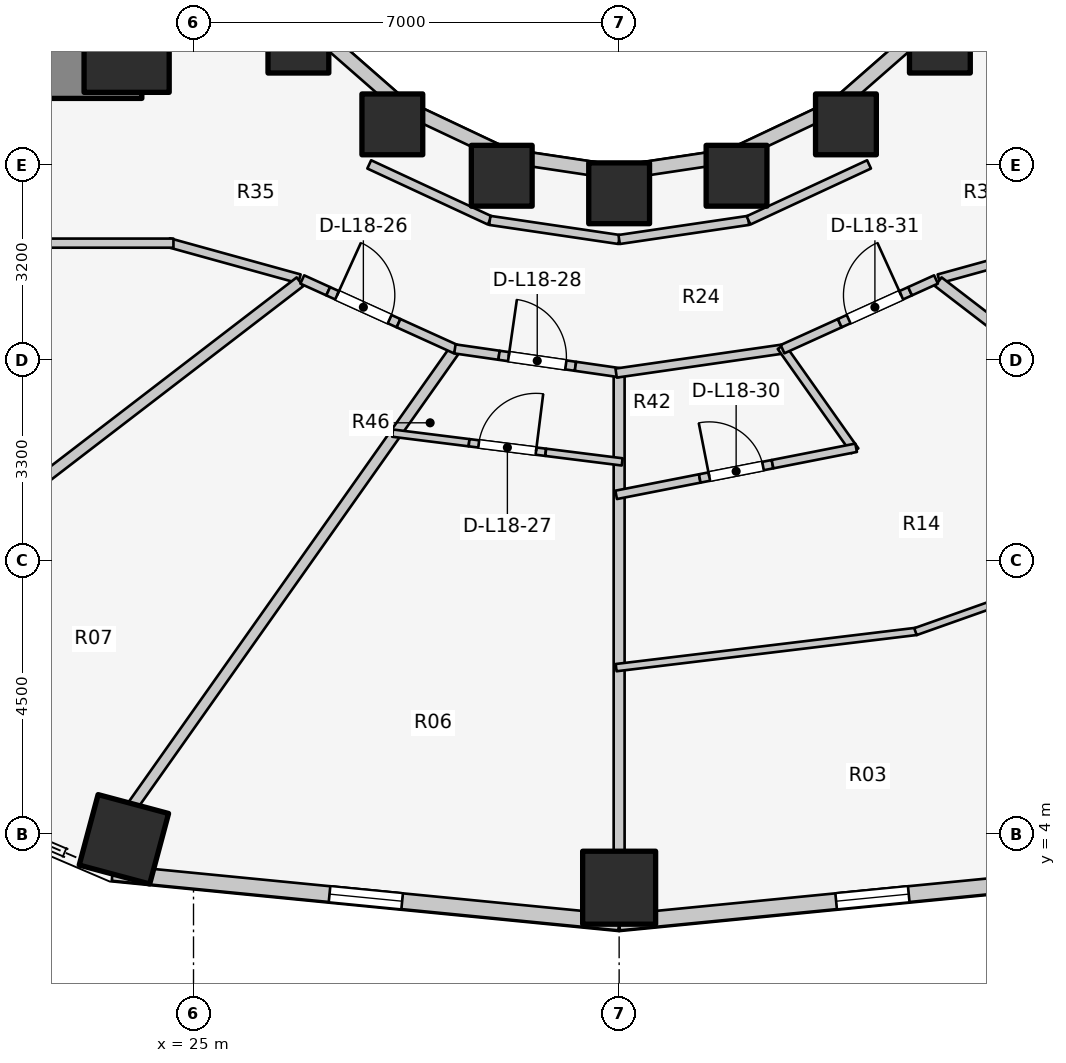
"""IFC4 building model, lengths in metres.
Left out: names, types, materials, properties, quantities, classifications, styles, units other than length and angle.
Written with IfcOpenShell. Run it as: python <this file> out.ifc"""

import sys

from ifc_helpers import new_model, si_unit, direction, frame, frame_2d, origin, origin_2d, place, context, subcontext, project, spatial, rectangle, extrude, element, fill, save


model = new_model("IFC4")
c1 = context("Model", 3, precision=1e-05, world=origin(), true_north=direction((0.0, 1.0)))
c2 = subcontext(c1, "Body", "Model", "MODEL_VIEW")
j1 = project(units=[si_unit("LENGTHUNIT", "METRE"), si_unit("PLANEANGLEUNIT", "RADIAN")], contexts=[c1])
p1 = place(None, origin())
s1 = spatial("IfcSite", under=j1, at=p1, CompositionType="ELEMENT")
p2 = place(p1, origin())
s2 = spatial("IfcBuilding", under=s1, at=p2, CompositionType="ELEMENT")
p3 = place(p2, frame((0.0, 0.0, 61.7)))
s3 = spatial("IfcBuildingStorey", under=s2, at=p3, CompositionType="ELEMENT", Elevation=61.7)
p4 = place(p3, frame((19.65, 16.55, 0.0), z_axis=(0.0, 0.0, 1.0), x_axis=(1.0, 0.0, 0.0)))
e1 = element("IfcWall", 1, at=p4, inside=s3, PredefinedType="SHEAR", context=c2, shape_type="SweptSolid", body=[
    extrude(rectangle(XDim=4.5, YDim=0.9, at=frame_2d((2.25, 0.0))), origin(), (0.0, 0.0, 1.0), 3.1),
])
p5 = place(p3, frame((23.9, 16.9, 0.0), z_axis=(0.0, 0.0, 1.0), x_axis=(1.0, 0.0, 0.0)))
e2 = element("IfcColumn", 2, at=p5, inside=s3, PredefinedType="COLUMN", context=c2, shape_type="SweptSolid", body=[
    extrude(rectangle(XDim=1.4, YDim=1.4, at=origin_2d()), origin(), (0.0, 0.0, 1.0), 3.1),
])
for number, where, z_axis, x_axis in (
    (3, (26.725, 17.018, 0.0), (0.0, 0.0, 1.0), (1.0, 0.0, 0.0)),
    (4, (28.27, 15.673, 0.0), (0.0, 0.0, 1.0), (1.0, 0.0, 0.0)),
    (5, (30.069, 14.828, 0.0), (0.0, 0.0, 1.0), (1.0, 0.0, 0.0)),
):
    element("IfcColumn", number, at=place(p3, frame(where, z_axis=z_axis, x_axis=x_axis)), inside=s3, PredefinedType="COLUMN", context=c2, shape_type="SweptSolid", body=[
        extrude(rectangle(XDim=1.0, YDim=1.0, at=origin_2d()), origin(), (0.0, 0.0, 1.0), 3.1),
    ])
p6 = place(p3, frame((23.855, 3.916, 0.0), z_axis=(0.0, 0.0, 1.0), x_axis=(-0.258819045103, -0.965925826289, 0.0)))
e6 = element("IfcColumn", 6, at=p6, inside=s3, PredefinedType="COLUMN", context=c2, shape_type="SweptSolid", body=[
    extrude(rectangle(XDim=1.2, YDim=1.2, at=origin_2d()), origin(), (0.0, 0.0, 1.0), 3.1),
])
p7 = place(p3, frame((32.0, 14.54, 0.0), z_axis=(0.0, 0.0, 1.0), x_axis=(1.0, 0.0, 0.0)))
e7 = element("IfcColumn", 7, at=p7, inside=s3, PredefinedType="COLUMN", context=c2, shape_type="SweptSolid", body=[
    extrude(rectangle(XDim=1.0, YDim=1.0, at=origin_2d()), origin(), (0.0, 0.0, 1.0), 3.1),
])
p8 = place(p3, frame((32.0, 3.12, 0.0), z_axis=(0.0, 0.0, 1.0), x_axis=(0.0, -1.0, 0.0)))
e8 = element("IfcColumn", 8, at=p8, inside=s3, PredefinedType="COLUMN", context=c2, shape_type="SweptSolid", body=[
    extrude(rectangle(XDim=1.2, YDim=1.2, at=origin_2d()), origin(), (0.0, 0.0, 1.0), 3.1),
])
for number, where, z_axis, x_axis in (
    (9, (33.931, 14.828, 0.0), (0.0, 0.0, 1.0), (1.0, 0.0, 0.0)),
    (10, (35.73, 15.673, 0.0), (0.0, 0.0, 1.0), (1.0, 0.0, 0.0)),
    (11, (37.275, 17.018, 0.0), (0.0, 0.0, 1.0), (1.0, 0.0, 0.0)),
):
    element("IfcColumn", number, at=place(p3, frame(where, z_axis=z_axis, x_axis=x_axis)), inside=s3, PredefinedType="COLUMN", context=c2, shape_type="SweptSolid", body=[
        extrude(rectangle(XDim=1.0, YDim=1.0, at=origin_2d()), origin(), (0.0, 0.0, 1.0), 3.1),
    ])
p9 = place(p3, frame((26.965, 17.258, 0.0), z_axis=(0.0, 0.0, 1.0), x_axis=(0.752576694707, -0.658504607869, 0.0)))
e12 = element("IfcWall", 12, at=p9, inside=s3, PredefinedType="STANDARD", context=c2, shape_type="SweptSolid", body=[
    extrude(rectangle(XDim=1.959, YDim=0.23, at=frame_2d((0.98, 0.0))), origin(), (0.0, 0.0, 1.0), 1.22),
])
p10 = place(p3, frame((28.44, 15.968, 0.0), z_axis=(0.0, 0.0, 1.0), x_axis=(0.904179699603, -0.427152280606, 0.0)))
e13 = element("IfcWall", 13, at=p10, inside=s3, PredefinedType="STANDARD", context=c2, shape_type="SweptSolid", body=[
    extrude(rectangle(XDim=1.899, YDim=0.23, at=frame_2d((0.95, 0.0))), origin(), (0.0, 0.0, 1.0), 1.22),
])
for number, where, z_axis, x_axis in (
    (14, (30.157, 15.157, 0.0), (0.0, 0.0, 1.0), (0.989, -0.149, 0.0)),
    (15, (32.0, 14.88, 0.0), (0.0, 0.0, 1.0), (0.989, 0.149, 0.0)),
):
    element("IfcWall", number, at=place(p3, frame(where, z_axis=z_axis, x_axis=x_axis)), inside=s3, PredefinedType="STANDARD", context=c2, shape_type="SweptSolid", body=[
        extrude(rectangle(XDim=1.864, YDim=0.23, at=frame_2d((0.932, 0.0))), origin(), (0.0, 0.0, 1.0), 1.22),
    ])
p11 = place(p3, frame((33.843, 15.157, 0.0), z_axis=(0.0, 0.0, 1.0), x_axis=(0.904179699603, 0.427152280606, 0.0)))
e16 = element("IfcWall", 16, at=p11, inside=s3, PredefinedType="STANDARD", context=c2, shape_type="SweptSolid", body=[
    extrude(rectangle(XDim=1.899, YDim=0.23, at=frame_2d((0.95, 0.0))), origin(), (0.0, 0.0, 1.0), 1.22),
])
p12 = place(p3, frame((35.56, 15.968, 0.0), z_axis=(0.0, 0.0, 1.0), x_axis=(0.752576694707, 0.658504607869, 0.0)))
e17 = element("IfcWall", 17, at=p12, inside=s3, PredefinedType="STANDARD", context=c2, shape_type="SweptSolid", body=[
    extrude(rectangle(XDim=1.959, YDim=0.23, at=frame_2d((0.98, 0.0))), origin(), (0.0, 0.0, 1.0), 1.22),
])
p13 = place(p3, frame((23.668, 3.364, 0.0), z_axis=(0.0, 0.0, 1.0), x_axis=(0.995247718352, -0.097375454379, 0.0)))
e18 = element("IfcWall", 18, at=p13, inside=s3, PredefinedType="STANDARD", context=c2, shape_type="SweptSolid", body=[
    extrude(rectangle(XDim=8.372, YDim=0.26, at=frame_2d((4.186, 0.0))), origin(), (0.0, 0.0, 1.0), 1.22),
])
p14 = place(p13, frame((3.586, 0.0, 0.15)))
e19 = element("IfcOpeningElement", 19, at=p14, cuts=e18, PredefinedType="OPENING", context=c2, shape_type="SweptSolid", body=[
    extrude(rectangle(XDim=1.2, YDim=0.9, at=frame_2d((0.6, 0.45))), frame((0.0, 0.14, 0.0), z_axis=(0.0, -1.0, 0.0), x_axis=(1.0, 0.0, 0.0)), (0.0, 0.0, 1.0), 0.28),
])
p15 = place(p3, frame((32.0, 2.549, 0.0), z_axis=(0.0, 0.0, 1.0), x_axis=(0.995247718352, 0.097375454379, 0.0)))
e20 = element("IfcWall", 20, at=p15, inside=s3, PredefinedType="STANDARD", context=c2, shape_type="SweptSolid", body=[
    extrude(rectangle(XDim=8.372, YDim=0.26, at=frame_2d((4.186, 0.0))), origin(), (0.0, 0.0, 1.0), 1.22),
])
p16 = place(p15, frame((3.586, 0.0, 0.15)))
e21 = element("IfcOpeningElement", 21, at=p16, cuts=e20, PredefinedType="OPENING", context=c2, shape_type="SweptSolid", body=[
    extrude(rectangle(XDim=1.2, YDim=0.9, at=frame_2d((0.6, 0.45))), frame((0.0, 0.14, 0.0), z_axis=(0.0, -1.0, 0.0), x_axis=(1.0, 0.0, 0.0)), (0.0, 0.0, 1.0), 0.28),
])
p17 = place(p3, frame((27.89, 15.015, 0.0), z_axis=(0.0, 0.0, 1.0), x_axis=(0.906943449489, -0.421252393975, 0.0)))
e22 = element("IfcWall", 22, at=p17, inside=s3, PredefinedType="PARTITIONING", context=c2, shape_type="SweptSolid", body=[
    extrude(rectangle(XDim=2.186, YDim=0.15, at=frame_2d((1.093, 0.0))), origin(), (0.0, 0.0, 1.0), 1.22),
])
for number, where, z_axis, x_axis in (
    (23, (29.873, 14.094, 0.0), (0.0, 0.0, 1.0), (0.989, -0.146, 0.0)),
    (24, (32.0, 13.78, 0.0), (0.0, 0.0, 1.0), (0.989, 0.146, 0.0)),
):
    element("IfcWall", number, at=place(p3, frame(where, z_axis=z_axis, x_axis=x_axis)), inside=s3, PredefinedType="PARTITIONING", context=c2, shape_type="SweptSolid", body=[
        extrude(rectangle(XDim=2.151, YDim=0.15, at=frame_2d((1.075, 0.0))), origin(), (0.0, 0.0, 1.0), 1.22),
    ])
p18 = place(p3, frame((34.127, 14.094, 0.0), z_axis=(0.0, 0.0, 1.0), x_axis=(0.906943449489, 0.421252393975, 0.0)))
e25 = element("IfcWall", 25, at=p18, inside=s3, PredefinedType="PARTITIONING", context=c2, shape_type="SweptSolid", body=[
    extrude(rectangle(XDim=2.186, YDim=0.15, at=frame_2d((1.093, 0.0))), origin(), (0.0, 0.0, 1.0), 1.22),
])
p19 = place(p3, frame((26.742, 13.133, 0.0), z_axis=(0.0, 0.0, 1.0), x_axis=(-0.963833843713, 0.266503886865, 0.0)))
e26 = element("IfcWall", 26, at=p19, inside=s3, PredefinedType="PARTITIONING", context=c2, shape_type="SweptSolid", body=[
    extrude(rectangle(XDim=2.232, YDim=0.15, at=frame_2d((1.116, 0.0))), origin(), (0.0, 0.0, 1.0), 1.22),
])
p20 = place(p3, frame((19.51, 13.72, 0.0), z_axis=(0.0, 0.0, 1.0), x_axis=(1.0, 0.0, 0.0)))
e27 = element("IfcWall", 27, at=p20, inside=s3, PredefinedType="PARTITIONING", context=c2, shape_type="SweptSolid", body=[
    extrude(rectangle(XDim=5.16, YDim=0.15, at=frame_2d((2.58, 0.0))), origin(), (0.0, 0.0, 1.0), 1.22),
])
p21 = place(p3, frame((37.258, 13.133, 0.0), z_axis=(0.0, 0.0, 1.0), x_axis=(0.963833843713, 0.266503886865, 0.0)))
e28 = element("IfcWall", 28, at=p21, inside=s3, PredefinedType="PARTITIONING", context=c2, shape_type="SweptSolid", body=[
    extrude(rectangle(XDim=2.232, YDim=0.15, at=frame_2d((1.116, 0.0))), origin(), (0.0, 0.0, 1.0), 1.22),
])
p22 = place(p3, frame((26.751, 13.085, 0.0), z_axis=(0.0, 0.0, 1.0), x_axis=(-0.793181014702, -0.608985942298, 0.0)))
e29 = element("IfcWall", 29, at=p22, inside=s3, PredefinedType="PARTITIONING", context=c2, shape_type="SweptSolid", body=[
    extrude(rectangle(XDim=10.324, YDim=0.18, at=frame_2d((5.162, 0.0))), origin(), (0.0, 0.0, 1.0), 1.22),
])
p23 = place(p3, frame((29.274, 11.934, 0.0), z_axis=(0.0, 0.0, 1.0), x_axis=(-0.577036915124, -0.816718065543, 0.0)))
e30 = element("IfcWall", 30, at=p23, inside=s3, PredefinedType="PARTITIONING", context=c2, shape_type="SweptSolid", body=[
    extrude(rectangle(XDim=9.131, YDim=0.18, at=frame_2d((4.565, 0.0))), origin(), (0.0, 0.0, 1.0), 1.22),
])
p24 = place(p3, frame((32.0, 11.535, 0.0), z_axis=(0.0, 0.0, 1.0), x_axis=(0.0, -1.0, 0.0)))
e31 = element("IfcWall", 31, at=p24, inside=s3, PredefinedType="PARTITIONING", context=c2, shape_type="SweptSolid", body=[
    extrude(rectangle(XDim=7.835, YDim=0.18, at=frame_2d((3.917, 0.0))), origin(), (0.0, 0.0, 1.0), 1.22),
])
p25 = place(p3, frame((37.249, 13.085, 0.0), z_axis=(0.0, 0.0, 1.0), x_axis=(0.793181014702, -0.608985942298, 0.0)))
e32 = element("IfcWall", 32, at=p25, inside=s3, PredefinedType="PARTITIONING", context=c2, shape_type="SweptSolid", body=[
    extrude(rectangle(XDim=10.324, YDim=0.18, at=frame_2d((5.162, 0.0))), origin(), (0.0, 0.0, 1.0), 1.22),
])
p26 = place(p3, frame((26.789, 13.123, 0.0), z_axis=(0.0, 0.0, 1.0), x_axis=(0.910580557663, -0.413331644091, 0.0)))
e33 = element("IfcWall", 33, at=p26, inside=s3, PredefinedType="PARTITIONING", context=c2, shape_type="SweptSolid", body=[
    extrude(rectangle(XDim=0.469, YDim=0.15, at=frame_2d((0.234, 0.0))), origin(), (0.0, 0.0, 1.0), 2.575),
])
p27 = place(p3, frame((27.215, 12.929, 0.0), z_axis=(0.0, 0.0, 1.0), x_axis=(0.910491529429, -0.413527719553, 0.0)))
e34 = element("IfcWall", 34, at=p27, inside=s3, PredefinedType="PARTITIONING", context=c2, shape_type="SweptSolid", body=[
    extrude(rectangle(XDim=1.27, YDim=0.15, at=frame_2d((0.635, 0.0))), origin(), (0.0, 0.0, 1.0), 2.16),
])
p28 = place(p27, frame((0.16, 0.0, 0.0)))
e35 = element("IfcOpeningElement", 35, at=p28, cuts=e34, PredefinedType="OPENING", context=c2, shape_type="SweptSolid", body=[
    extrude(rectangle(XDim=0.95, YDim=2.1, at=frame_2d((0.475, 1.05))), frame((0.0, 0.085, 0.0), z_axis=(0.0, -1.0, 0.0), x_axis=(1.0, 0.0, 0.0)), (0.0, 0.0, 1.0), 0.17),
])
p29 = place(p3, frame((28.372, 12.404, 0.0), z_axis=(0.0, 0.0, 1.0), x_axis=(0.910657491524, -0.413162114831, 0.0)))
e36 = element("IfcWall", 36, at=p29, inside=s3, PredefinedType="PARTITIONING", context=c2, shape_type="SweptSolid", body=[
    extrude(rectangle(XDim=1.033, YDim=0.15, at=frame_2d((0.517, 0.0))), origin(), (0.0, 0.0, 1.0), 1.22),
])
p30 = place(p3, frame((28.274, 10.596, 0.0), z_axis=(0.0, 0.0, 1.0), x_axis=(0.992227415201, -0.124437761642, 0.0)))
e37 = element("IfcWall", 37, at=p30, inside=s3, PredefinedType="MOVABLE", context=c2, shape_type="SweptSolid", body=[
    extrude(rectangle(XDim=1.267, YDim=0.12, at=frame_2d((0.634, 0.0))), origin(), (0.0, 0.0, 1.0), 2.575),
])
p31 = place(p3, frame((29.532, 10.438, 0.0), z_axis=(0.0, 0.0, 1.0), x_axis=(0.992257157897, -0.124200372796, 0.0)))
e38 = element("IfcWall", 38, at=p31, inside=s3, PredefinedType="MOVABLE", context=c2, shape_type="SweptSolid", body=[
    extrude(rectangle(XDim=1.27, YDim=0.12, at=frame_2d((0.635, 0.0))), origin(), (0.0, 0.0, 1.0), 2.575),
])
p32 = place(p31, frame((0.16, 0.0, 0.0)))
e39 = element("IfcOpeningElement", 39, at=p32, cuts=e38, PredefinedType="OPENING", context=c2, shape_type="SweptSolid", body=[
    extrude(rectangle(XDim=0.95, YDim=2.1, at=frame_2d((0.475, 1.05))), frame((0.0, 0.07, 0.0), z_axis=(0.0, -1.0, 0.0), x_axis=(1.0, 0.0, 0.0)), (0.0, 0.0, 1.0), 0.14),
])
p33 = place(p3, frame((30.792, 10.28, 0.0), z_axis=(0.0, 0.0, 1.0), x_axis=(0.992251181548, -0.124248109512, 0.0)))
e40 = element("IfcWall", 40, at=p33, inside=s3, PredefinedType="MOVABLE", context=c2, shape_type="SweptSolid", body=[
    extrude(rectangle(XDim=1.267, YDim=0.12, at=frame_2d((0.634, 0.0))), origin(), (0.0, 0.0, 1.0), 1.22),
])
p34 = place(p3, frame((29.299, 11.981, 0.0), z_axis=(0.0, 0.0, 1.0), x_axis=(0.98974875873, -0.142819447526, 0.0)))
e41 = element("IfcWall", 41, at=p34, inside=s3, PredefinedType="PARTITIONING", context=c2, shape_type="SweptSolid", body=[
    extrude(rectangle(XDim=0.733, YDim=0.15, at=frame_2d((0.367, 0.0))), origin(), (0.0, 0.0, 1.0), 2.575),
])
p35 = place(p3, frame((30.024, 11.876, 0.0), z_axis=(0.0, 0.0, 1.0), x_axis=(0.98974859422, -0.142820587591, 0.0)))
e42 = element("IfcWall", 42, at=p35, inside=s3, PredefinedType="PARTITIONING", context=c2, shape_type="SweptSolid", body=[
    extrude(rectangle(XDim=1.27, YDim=0.15, at=frame_2d((0.635, 0.0))), origin(), (0.0, 0.0, 1.0), 2.575),
])
p36 = place(p35, frame((0.16, 0.0, 0.0)))
e43 = element("IfcOpeningElement", 43, at=p36, cuts=e42, PredefinedType="OPENING", context=c2, shape_type="SweptSolid", body=[
    extrude(rectangle(XDim=0.95, YDim=2.1, at=frame_2d((0.475, 1.05))), frame((0.0, 0.085, 0.0), z_axis=(0.0, -1.0, 0.0), x_axis=(1.0, 0.0, 0.0)), (0.0, 0.0, 1.0), 0.17),
])
p37 = place(p3, frame((31.281, 11.695, 0.0), z_axis=(0.0, 0.0, 1.0), x_axis=(0.98974875873, -0.142819447526, 0.0)))
e44 = element("IfcWall", 44, at=p37, inside=s3, PredefinedType="PARTITIONING", context=c2, shape_type="SweptSolid", body=[
    extrude(rectangle(XDim=0.733, YDim=0.15, at=frame_2d((0.367, 0.0))), origin(), (0.0, 0.0, 1.0), 1.22),
])
p38 = place(p3, frame((31.95, 6.739, 0.0), z_axis=(0.0, 0.0, 1.0), x_axis=(0.992797021108, 0.11980849252, 0.0)))
e45 = element("IfcWall", 45, at=p38, inside=s3, PredefinedType="MOVABLE", context=c2, shape_type="SweptSolid", body=[
    extrude(rectangle(XDim=4.978, YDim=0.12, at=frame_2d((2.489, 0.0))), origin(), (0.0, 0.0, 1.0), 1.22),
])
p39 = place(p3, frame((36.874, 7.331, 0.0), z_axis=(0.0, 0.0, 1.0), x_axis=(0.942721221588, 0.333581621747, 0.0)))
e46 = element("IfcWall", 46, at=p39, inside=s3, PredefinedType="MOVABLE", context=c2, shape_type="SweptSolid", body=[
    extrude(rectangle(XDim=2.247, YDim=0.12, at=frame_2d((1.124, 0.0))), origin(), (0.0, 0.0, 1.0), 1.22),
])
p40 = place(p3, frame((31.95, 11.583, 0.0), z_axis=(0.0, 0.0, 1.0), x_axis=(0.989761784218, 0.142729150844, 0.0)))
e47 = element("IfcWall", 47, at=p40, inside=s3, PredefinedType="PARTITIONING", context=c2, shape_type="SweptSolid", body=[
    extrude(rectangle(XDim=2.822, YDim=0.15, at=frame_2d((1.411, 0.0))), origin(), (0.0, 0.0, 1.0), 1.22),
])
p41 = place(p3, frame((34.665, 12.02, 0.0), z_axis=(0.0, 0.0, 1.0), x_axis=(0.577139575342, -0.816645523207, 0.0)))
e48 = element("IfcWall", 48, at=p41, inside=s3, PredefinedType="PLUMBINGWALL", context=c2, shape_type="SweptSolid", body=[
    extrude(rectangle(XDim=2.1, YDim=0.14, at=frame_2d((1.05, 0.0))), origin(), (0.0, 0.0, 1.0), 2.575),
])
p42 = place(p3, frame((31.951, 9.58, 0.0), z_axis=(0.0, 0.0, 1.0), x_axis=(0.981284705137, 0.192562528712, 0.0)))
e49 = element("IfcWall", 49, at=p42, inside=s3, PredefinedType="PLUMBINGWALL", context=c2, shape_type="SweptSolid", body=[
    extrude(rectangle(XDim=1.401, YDim=0.14, at=frame_2d((0.7, 0.0))), origin(), (0.0, 0.0, 1.0), 1.22),
])
p43 = place(p3, frame((33.326, 9.85, 0.0), z_axis=(0.0, 0.0, 1.0), x_axis=(0.981252199958, 0.192728098829, 0.0)))
e50 = element("IfcWall", 50, at=p43, inside=s3, PredefinedType="PLUMBINGWALL", context=c2, shape_type="SweptSolid", body=[
    extrude(rectangle(XDim=1.22, YDim=0.14, at=frame_2d((0.61, 0.0))), origin(), (0.0, 0.0, 1.0), 2.575),
])
p44 = place(p43, frame((0.16, 0.0, 0.0)))
e51 = element("IfcOpeningElement", 51, at=p44, cuts=e50, PredefinedType="OPENING", context=c2, shape_type="SweptSolid", body=[
    extrude(rectangle(XDim=0.9, YDim=2.1, at=frame_2d((0.45, 1.05))), frame((0.0, 0.08, 0.0), z_axis=(0.0, -1.0, 0.0), x_axis=(1.0, 0.0, 0.0)), (0.0, 0.0, 1.0), 0.16),
])
p45 = place(p3, frame((34.523, 10.085, 0.0), z_axis=(0.0, 0.0, 1.0), x_axis=(0.981284705137, 0.192562528712, 0.0)))
e52 = element("IfcWall", 52, at=p45, inside=s3, PredefinedType="PLUMBINGWALL", context=c2, shape_type="SweptSolid", body=[
    extrude(rectangle(XDim=1.401, YDim=0.14, at=frame_2d((0.7, 0.0))), origin(), (0.0, 0.0, 1.0), 1.22),
])
p46 = place(p3, frame((34.687, 11.977, 0.0), z_axis=(0.0, 0.0, 1.0), x_axis=(0.910657491524, 0.413162114831, 0.0)))
e53 = element("IfcWall", 53, at=p46, inside=s3, PredefinedType="PARTITIONING", context=c2, shape_type="SweptSolid", body=[
    extrude(rectangle(XDim=1.033, YDim=0.15, at=frame_2d((0.517, 0.0))), origin(), (0.0, 0.0, 1.0), 1.22),
])
p47 = place(p3, frame((35.628, 12.404, 0.0), z_axis=(0.0, 0.0, 1.0), x_axis=(0.910491529429, 0.413527719553, 0.0)))
e54 = element("IfcWall", 54, at=p47, inside=s3, PredefinedType="PARTITIONING", context=c2, shape_type="SweptSolid", body=[
    extrude(rectangle(XDim=1.27, YDim=0.15, at=frame_2d((0.635, 0.0))), origin(), (0.0, 0.0, 1.0), 2.16),
])
p48 = place(p47, frame((0.16, 0.0, 0.0)))
e55 = element("IfcOpeningElement", 55, at=p48, cuts=e54, PredefinedType="OPENING", context=c2, shape_type="SweptSolid", body=[
    extrude(rectangle(XDim=0.95, YDim=2.1, at=frame_2d((0.475, 1.05))), frame((0.0, 0.085, 0.0), z_axis=(0.0, -1.0, 0.0), x_axis=(1.0, 0.0, 0.0)), (0.0, 0.0, 1.0), 0.17),
])
p49 = place(p3, frame((36.785, 12.929, 0.0), z_axis=(0.0, 0.0, 1.0), x_axis=(0.910580557663, 0.413331644091, 0.0)))
e56 = element("IfcWall", 56, at=p49, inside=s3, PredefinedType="PARTITIONING", context=c2, shape_type="SweptSolid", body=[
    extrude(rectangle(XDim=0.469, YDim=0.15, at=frame_2d((0.234, 0.0))), origin(), (0.0, 0.0, 1.0), 2.575),
])
p50 = place(p14, origin())
e57 = element("IfcWindow", 57, at=p50, inside=s3, PartitioningType="SINGLE_PANEL", PredefinedType="WINDOW", context=c2, shape_type="SweptSolid", body=[
    extrude(rectangle(XDim=1.2, YDim=0.9, at=frame_2d((0.6, 0.45))), frame((0.0, 0.03, 0.0), z_axis=(0.0, -1.0, 0.0), x_axis=(1.0, 0.0, 0.0)), (0.0, 0.0, 1.0), 0.06),
])
fill(e19, e57)
p51 = place(p16, origin())
e58 = element("IfcWindow", 58, at=p51, inside=s3, PartitioningType="SINGLE_PANEL", PredefinedType="WINDOW", context=c2, shape_type="SweptSolid", body=[
    extrude(rectangle(XDim=1.2, YDim=0.9, at=frame_2d((0.6, 0.45))), frame((0.0, 0.03, 0.0), z_axis=(0.0, -1.0, 0.0), x_axis=(1.0, 0.0, 0.0)), (0.0, 0.0, 1.0), 0.06),
])
fill(e21, e58)
p52 = place(p28, origin())
e59 = element("IfcDoor", 59, at=p52, inside=s3, OperationType="SINGLE_SWING_LEFT", PredefinedType="DOOR", context=c2, shape_type="SweptSolid", body=[
    extrude(rectangle(XDim=0.95, YDim=2.1, at=frame_2d((0.475, 1.05))), frame((0.0, 0.025, 0.0), z_axis=(0.0, -1.0, 0.0), x_axis=(1.0, 0.0, 0.0)), (0.0, 0.0, 1.0), 0.05),
])
fill(e35, e59)
p53 = place(p32, origin())
e60 = element("IfcDoor", 60, at=p53, inside=s3, OperationType="SINGLE_SWING_RIGHT", PredefinedType="DOOR", context=c2, shape_type="SweptSolid", body=[
    extrude(rectangle(XDim=0.95, YDim=2.1, at=frame_2d((0.475, 1.05))), frame((0.0, 0.025, 0.0), z_axis=(0.0, -1.0, 0.0), x_axis=(1.0, 0.0, 0.0)), (0.0, 0.0, 1.0), 0.05),
])
fill(e39, e60)
p54 = place(p36, origin())
e61 = element("IfcDoor", 61, at=p54, inside=s3, OperationType="SINGLE_SWING_LEFT", PredefinedType="DOOR", context=c2, shape_type="SweptSolid", body=[
    extrude(rectangle(XDim=0.95, YDim=2.1, at=frame_2d((0.475, 1.05))), frame((0.0, 0.025, 0.0), z_axis=(0.0, -1.0, 0.0), x_axis=(1.0, 0.0, 0.0)), (0.0, 0.0, 1.0), 0.05),
])
fill(e43, e61)
p55 = place(p44, origin())
e62 = element("IfcDoor", 62, at=p55, inside=s3, OperationType="SINGLE_SWING_LEFT", PredefinedType="DOOR", context=c2, shape_type="SweptSolid", body=[
    extrude(rectangle(XDim=0.9, YDim=2.1, at=frame_2d((0.45, 1.05))), frame((0.0, 0.025, 0.0), z_axis=(0.0, -1.0, 0.0), x_axis=(1.0, 0.0, 0.0)), (0.0, 0.0, 1.0), 0.05),
])
fill(e51, e62)
p56 = place(p48, origin())
e63 = element("IfcDoor", 63, at=p56, inside=s3, OperationType="SINGLE_SWING_RIGHT", PredefinedType="DOOR", context=c2, shape_type="SweptSolid", body=[
    extrude(rectangle(XDim=0.95, YDim=2.1, at=frame_2d((0.475, 1.05))), frame((0.0, 0.025, 0.0), z_axis=(0.0, -1.0, 0.0), x_axis=(1.0, 0.0, 0.0)), (0.0, 0.0, 1.0), 0.05),
])
fill(e55, e63)
save(model, sys.argv[1])
